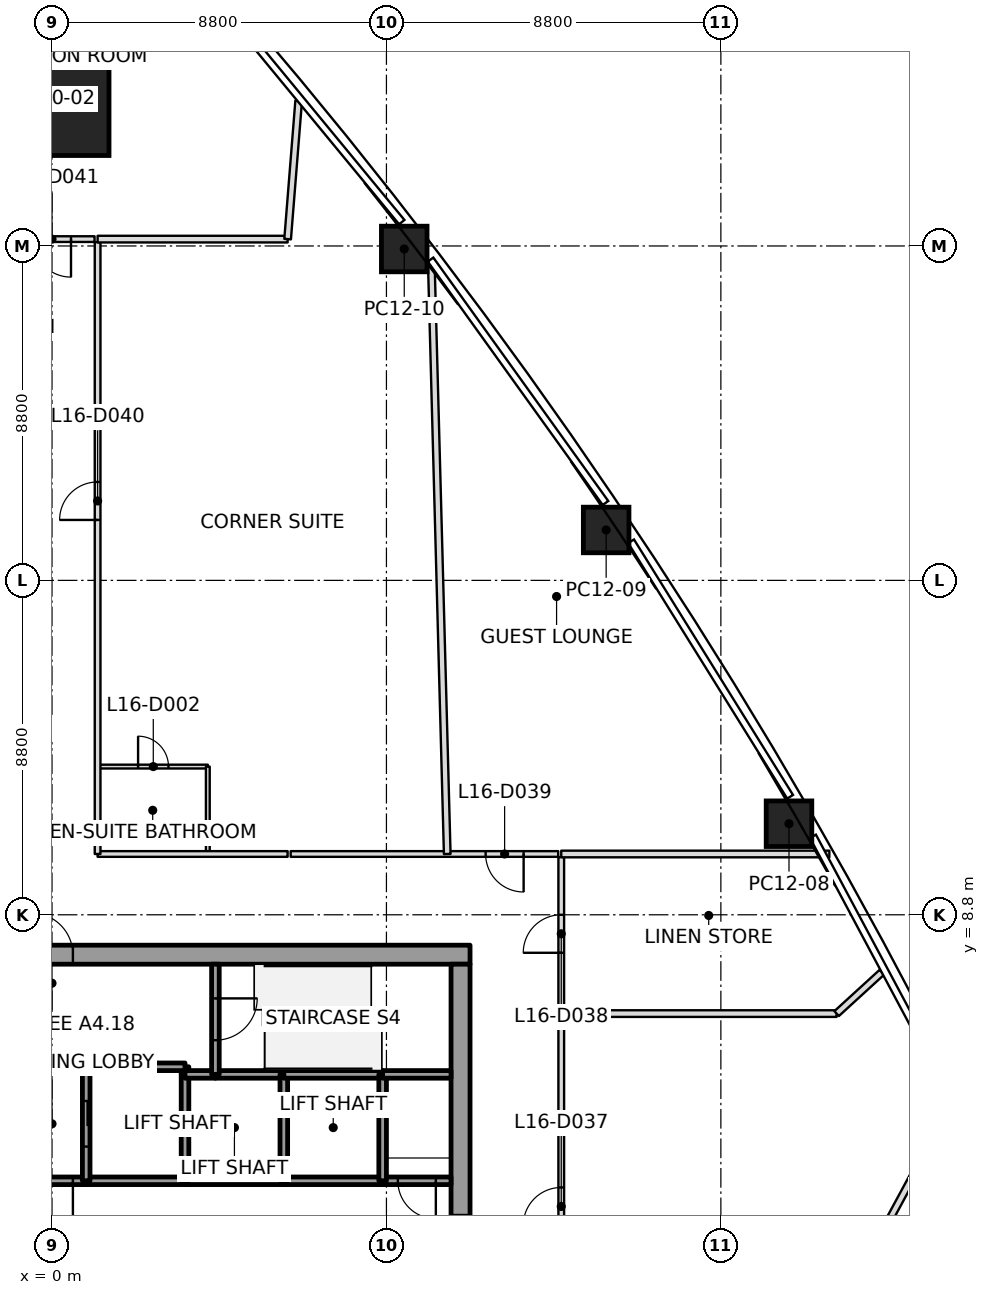
"""IFC4 building model, lengths in metres.
Left out: names, types, materials, properties, quantities, classifications, styles, units other than length and angle.
Written with IfcOpenShell. Run it as: python <this file> out.ifc"""

import sys

from ifc_helpers import new_model, si_unit, direction, frame, frame_2d, origin, origin_2d, place, context, subcontext, project, spatial, rectangle, extrude, element, fill, save


model = new_model("IFC4")
c1 = context("Model", 3, precision=1e-05, world=origin(), true_north=direction((0.0, 1.0)))
c2 = subcontext(c1, "Body", "Model", "MODEL_VIEW")
j1 = project(units=[si_unit("LENGTHUNIT", "METRE"), si_unit("PLANEANGLEUNIT", "RADIAN")], contexts=[c1])
p1 = place(None, origin())
s1 = spatial("IfcSite", under=j1, at=p1, CompositionType="ELEMENT")
p2 = place(p1, origin())
s2 = spatial("IfcBuilding", under=s1, at=p2, CompositionType="ELEMENT")
p3 = place(p2, frame((0.0, 0.0, 81.3)))
s3 = spatial("IfcBuildingStorey", under=s2, at=p3, CompositionType="ELEMENT", Elevation=81.3)
p4 = place(p3, frame((0.0, 30.281, 0.0), z_axis=(0.0, -0.035214042205, 0.999379793288), x_axis=(1.0, 0.0, 0.0)))
e1 = element("IfcColumn", 1, at=p4, inside=s3, PredefinedType="COLUMN", context=c2, shape_type="SweptSolid", body=[
    extrude(rectangle(XDim=3.0, YDim=3.0, at=origin_2d()), origin(), (0.0, 0.0, 1.0), 3.702),
])
p5 = place(p3, frame((19.393, 11.196, 0.0), z_axis=(-0.010688729499, -0.00613612249, 0.999924046647), x_axis=(-0.49997143695, 0.866041893524, -2.9922579e-05)))
e2 = element("IfcColumn", 2, at=p5, inside=s3, PredefinedType="COLUMN", context=c2, shape_type="SweptSolid", body=[
    extrude(rectangle(XDim=1.2, YDim=1.2, at=origin_2d()), origin(), (0.0, 0.0, 1.0), 3.7),
])
p6 = place(p3, frame((14.582, 18.926, 0.0), z_axis=(-0.005674016471, -0.014382971985, 0.999880460682), x_axis=(-0.556275058009, 0.830951674334, 0.008796292314)))
e3 = element("IfcColumn", 3, at=p6, inside=s3, PredefinedType="COLUMN", context=c2, shape_type="SweptSolid", body=[
    extrude(rectangle(XDim=1.2, YDim=1.2, at=origin_2d()), origin(), (0.0, 0.0, 1.0), 3.7),
])
p7 = place(p3, frame((9.269, 26.32, 0.0), z_axis=(-0.00019790496, -0.022363260521, 0.999749891429), x_axis=(-0.610123026815, 0.792111234616, 0.0175978449)))
e4 = element("IfcColumn", 4, at=p7, inside=s3, PredefinedType="COLUMN", context=c2, shape_type="SweptSolid", body=[
    extrude(rectangle(XDim=1.2, YDim=1.2, at=origin_2d()), origin(), (0.0, 0.0, 1.0), 3.701),
])
p8 = place(p3, frame((-11.0, 7.75, 0.0), z_axis=(0.0, 0.0, 1.0), x_axis=(1.0, 0.0, 0.0)))
e5 = element("IfcWall", 5, at=p8, inside=s3, PredefinedType="SHEAR", context=c2, shape_type="SweptSolid", body=[
    extrude(rectangle(XDim=22.0, YDim=0.5, at=frame_2d((11.0, 0.0))), origin(), (0.0, 0.0, 1.0), 3.7),
])
p9 = place(p8, frame((10.45, 0.0, 0.0)))
e6 = element("IfcOpeningElement", 6, at=p9, cuts=e5, PredefinedType="OPENING", context=c2, shape_type="SweptSolid", body=[
    extrude(rectangle(XDim=1.1, YDim=2.1, at=frame_2d((0.55, 1.05))), frame((0.0, 0.25, 0.0), z_axis=(0.0, -1.0, 0.0), x_axis=(1.0, 0.0, 0.0)), (0.0, 0.0, 1.0), 0.5),
])
p10 = place(p3, frame((10.75, -7.5, 0.0), z_axis=(0.0, 0.0, 1.0), x_axis=(0.0, 1.0, 0.0)))
e7 = element("IfcWall", 7, at=p10, inside=s3, PredefinedType="SHEAR", context=c2, shape_type="SweptSolid", body=[
    extrude(rectangle(XDim=15.0, YDim=0.5, at=frame_2d((7.5, 0.0))), origin(), (0.0, 0.0, 1.0), 3.7),
])
p11 = place(p10, frame((6.6, 0.0, 0.0)))
e8 = element("IfcOpeningElement", 8, at=p11, cuts=e7, PredefinedType="OPENING", context=c2, shape_type="SweptSolid", body=[
    extrude(rectangle(XDim=1.8, YDim=2.1, at=frame_2d((0.9, 1.05))), frame((0.0, 0.25, 0.0), z_axis=(0.0, -1.0, 0.0), x_axis=(1.0, 0.0, 0.0)), (0.0, 0.0, 1.0), 0.5),
])
p12 = place(p3, frame((0.9, 1.8, 0.0), z_axis=(0.0, 0.0, 1.0), x_axis=(-1.0, 0.0, 0.0)))
e9 = element("IfcWall", 9, at=p12, inside=s3, PredefinedType="SOLIDWALL", context=c2, shape_type="SweptSolid", body=[
    extrude(rectangle(XDim=1.8, YDim=0.2, at=frame_2d((0.9, 0.0))), origin(), (0.0, 0.0, 1.0), 3.55),
])
p13 = place(p12, frame((0.35, 0.0, 0.0)))
e10 = element("IfcOpeningElement", 10, at=p13, cuts=e9, PredefinedType="OPENING", context=c2, shape_type="SweptSolid", body=[
    extrude(rectangle(XDim=1.1, YDim=2.1, at=frame_2d((0.55, 1.05))), frame((0.0, 0.1, 0.0), z_axis=(0.0, -1.0, 0.0), x_axis=(1.0, 0.0, 0.0)), (0.0, 0.0, 1.0), 0.2),
])
p14 = place(p3, frame((3.5, 1.8, 0.0), z_axis=(0.0, 0.0, 1.0), x_axis=(-1.0, 0.0, 0.0)))
e11 = element("IfcWall", 11, at=p14, inside=s3, PredefinedType="SOLIDWALL", context=c2, shape_type="SweptSolid", body=[
    extrude(rectangle(XDim=2.6, YDim=0.2, at=frame_2d((1.3, 0.0))), origin(), (0.0, 0.0, 1.0), 3.55),
])
p15 = place(p3, frame((3.5, 4.6, 0.0), z_axis=(0.0, 0.0, 1.0), x_axis=(0.0, 1.0, 0.0)))
e12 = element("IfcWall", 12, at=p15, inside=s3, PredefinedType="SOLIDWALL", context=c2, shape_type="SweptSolid", body=[
    extrude(rectangle(XDim=0.2, YDim=0.2, at=frame_2d((0.1, 0.0))), origin(), (0.0, 0.0, 1.0), 3.55),
])
p16 = place(p3, frame((3.5, 4.8, 0.0), z_axis=(0.0, 0.0, 1.0), x_axis=(-1.0, 0.0, 0.0)))
e13 = element("IfcWall", 13, at=p16, inside=s3, PredefinedType="SOLIDWALL", context=c2, shape_type="SweptSolid", body=[
    extrude(rectangle(XDim=2.6, YDim=0.2, at=frame_2d((1.3, 0.0))), origin(), (0.0, 0.0, 1.0), 3.55),
])
p17 = place(p3, frame((0.9, 4.8, 0.0), z_axis=(0.0, 0.0, 1.0), x_axis=(0.0, -1.0, 0.0)))
e14 = element("IfcWall", 14, at=p17, inside=s3, PredefinedType="SOLIDWALL", context=c2, shape_type="SweptSolid", body=[
    extrude(rectangle(XDim=3.0, YDim=0.2, at=frame_2d((1.5, 0.0))), origin(), (0.0, 0.0, 1.0), 3.55),
])
p18 = place(p17, frame((0.9, 0.0, 0.0)))
e15 = element("IfcOpeningElement", 15, at=p18, cuts=e14, PredefinedType="OPENING", context=c2, shape_type="SweptSolid", body=[
    extrude(rectangle(XDim=1.2, YDim=2.1, at=frame_2d((0.6, 1.05))), frame((0.0, 0.1, 0.0), z_axis=(0.0, -1.0, 0.0), x_axis=(1.0, 0.0, 0.0)), (0.0, 0.0, 1.0), 0.2),
])
p19 = place(p3, frame((6.1, 1.8, 0.0), z_axis=(0.0, 0.0, 1.0), x_axis=(-1.0, 0.0, 0.0)))
e16 = element("IfcWall", 16, at=p19, inside=s3, PredefinedType="SOLIDWALL", context=c2, shape_type="SweptSolid", body=[
    extrude(rectangle(XDim=2.6, YDim=0.2, at=frame_2d((1.3, 0.0))), origin(), (0.0, 0.0, 1.0), 3.55),
])
p20 = place(p3, frame((3.5, 1.8, 0.0), z_axis=(0.0, 0.0, 1.0), x_axis=(0.0, 1.0, 0.0)))
e17 = element("IfcWall", 17, at=p20, inside=s3, PredefinedType="SOLIDWALL", context=c2, shape_type="SweptSolid", body=[
    extrude(rectangle(XDim=2.8, YDim=0.2, at=frame_2d((1.4, 0.0))), origin(), (0.0, 0.0, 1.0), 3.55),
])
p21 = place(p3, frame((4.3, 4.6, 0.0), z_axis=(0.0, 0.0, 1.0), x_axis=(-1.0, 0.0, 0.0)))
e18 = element("IfcWall", 18, at=p21, inside=s3, PredefinedType="SOLIDWALL", context=c2, shape_type="SweptSolid", body=[
    extrude(rectangle(XDim=0.8, YDim=0.2, at=frame_2d((0.4, 0.0))), origin(), (0.0, 0.0, 1.0), 3.55),
])
p22 = place(p3, frame((6.1, 4.6, 0.0), z_axis=(0.0, 0.0, 1.0), x_axis=(-1.0, 0.0, 0.0)))
e19 = element("IfcWall", 19, at=p22, inside=s3, PredefinedType="SOLIDWALL", context=c2, shape_type="SweptSolid", body=[
    extrude(rectangle(XDim=1.8, YDim=0.2, at=frame_2d((0.9, 0.0))), origin(), (0.0, 0.0, 1.0), 3.55),
])
p23 = place(p3, frame((4.3, 7.5, 0.0), z_axis=(0.0, 0.0, 1.0), x_axis=(0.0, -1.0, 0.0)))
e20 = element("IfcWall", 20, at=p23, inside=s3, PredefinedType="SOLIDWALL", context=c2, shape_type="SweptSolid", body=[
    extrude(rectangle(XDim=2.9, YDim=0.2, at=frame_2d((1.45, 0.0))), origin(), (0.0, 0.0, 1.0), 3.55),
])
p24 = place(p23, frame((0.9, 0.0, 0.0)))
e21 = element("IfcOpeningElement", 21, at=p24, cuts=e20, PredefinedType="OPENING", context=c2, shape_type="SweptSolid", body=[
    extrude(rectangle(XDim=1.1, YDim=2.1, at=frame_2d((0.55, 1.05))), frame((0.0, 0.1, 0.0), z_axis=(0.0, -1.0, 0.0), x_axis=(1.0, 0.0, 0.0)), (0.0, 0.0, 1.0), 0.2),
])
p25 = place(p3, frame((8.7, 1.8, 0.0), z_axis=(0.0, 0.0, 1.0), x_axis=(-1.0, 0.0, 0.0)))
e22 = element("IfcWall", 22, at=p25, inside=s3, PredefinedType="SOLIDWALL", context=c2, shape_type="SweptSolid", body=[
    extrude(rectangle(XDim=2.6, YDim=0.2, at=frame_2d((1.3, 0.0))), origin(), (0.0, 0.0, 1.0), 3.55),
])
p26 = place(p3, frame((6.1, 1.8, 0.0), z_axis=(0.0, 0.0, 1.0), x_axis=(0.0, 1.0, 0.0)))
e23 = element("IfcWall", 23, at=p26, inside=s3, PredefinedType="SOLIDWALL", context=c2, shape_type="SweptSolid", body=[
    extrude(rectangle(XDim=2.8, YDim=0.2, at=frame_2d((1.4, 0.0))), origin(), (0.0, 0.0, 1.0), 3.55),
])
p27 = place(p3, frame((8.7, 4.6, 0.0), z_axis=(0.0, 0.0, 1.0), x_axis=(-1.0, 0.0, 0.0)))
e24 = element("IfcWall", 24, at=p27, inside=s3, PredefinedType="SOLIDWALL", context=c2, shape_type="SweptSolid", body=[
    extrude(rectangle(XDim=2.6, YDim=0.2, at=frame_2d((1.3, 0.0))), origin(), (0.0, 0.0, 1.0), 3.55),
])
p28 = place(p3, frame((10.5, 1.8, 0.0), z_axis=(0.0, 0.0, 1.0), x_axis=(-1.0, 0.0, 0.0)))
e25 = element("IfcWall", 25, at=p28, inside=s3, PredefinedType="SOLIDWALL", context=c2, shape_type="SweptSolid", body=[
    extrude(rectangle(XDim=1.8, YDim=0.2, at=frame_2d((0.9, 0.0))), origin(), (0.0, 0.0, 1.0), 3.55),
])
p29 = place(p28, frame((0.4, 0.0, 0.0)))
e26 = element("IfcOpeningElement", 26, at=p29, cuts=e25, PredefinedType="OPENING", context=c2, shape_type="SweptSolid", body=[
    extrude(rectangle(XDim=1.0, YDim=2.1, at=frame_2d((0.5, 1.05))), frame((0.0, 0.1, 0.0), z_axis=(0.0, -1.0, 0.0), x_axis=(1.0, 0.0, 0.0)), (0.0, 0.0, 1.0), 0.2),
])
p30 = place(p3, frame((8.7, 4.6, 0.0), z_axis=(0.0, 0.0, 1.0), x_axis=(0.0, -1.0, 0.0)))
e27 = element("IfcWall", 27, at=p30, inside=s3, PredefinedType="SOLIDWALL", context=c2, shape_type="SweptSolid", body=[
    extrude(rectangle(XDim=2.8, YDim=0.2, at=frame_2d((1.4, 0.0))), origin(), (0.0, 0.0, 1.0), 3.55),
])
p31 = place(p3, frame((10.5, 4.6, 0.0), z_axis=(0.0, 0.0, 1.0), x_axis=(-1.0, 0.0, 0.0)))
e28 = element("IfcWall", 28, at=p31, inside=s3, PredefinedType="SOLIDWALL", context=c2, shape_type="SweptSolid", body=[
    extrude(rectangle(XDim=1.8, YDim=0.2, at=frame_2d((0.9, 0.0))), origin(), (0.0, 0.0, 1.0), 3.55),
])
p32 = place(p3, frame((1.2, 26.581, 0.0), z_axis=(0.0, 0.0, 1.0), x_axis=(1.0, 0.0, 0.0)))
e29 = element("IfcWall", 29, at=p32, inside=s3, PredefinedType="PARTITIONING", context=c2, shape_type="SweptSolid", body=[
    extrude(rectangle(XDim=5.0, YDim=0.175, at=frame_2d((2.5, 0.0))), origin(), (0.0, 0.0, 1.0), 3.15),
])
p33 = place(p3, frame((6.2, 26.581, 0.0), z_axis=(0.0, 0.0, 1.0), x_axis=(0.079662809164, 0.996821868157, 0.0)))
e30 = element("IfcWall", 30, at=p33, inside=s3, PredefinedType="PARTITIONING", context=c2, shape_type="SweptSolid", body=[
    extrude(rectangle(XDim=3.65, YDim=0.175, at=frame_2d((1.825, 0.0))), origin(), (0.0, 0.0, 1.0), 2.934),
])
p34 = place(p3, frame((9.981, 25.913, 0.0), z_axis=(0.0, 0.0, 1.0), x_axis=(0.02696447667, -0.999636392394, 0.0)))
e31 = element("IfcWall", 31, at=p34, inside=s3, PredefinedType="PARTITIONING", context=c2, shape_type="SweptSolid", body=[
    extrude(rectangle(XDim=15.519, YDim=0.175, at=frame_2d((7.759, 0.0))), origin(), (0.0, 0.0, 1.0), 2.934),
])
p35 = place(p3, frame((13.4, 6.2, 0.0), z_axis=(0.0, 0.0, 1.0), x_axis=(1.0, 0.0, 0.0)))
e32 = element("IfcWall", 32, at=p35, inside=s3, PredefinedType="PARTITIONING", context=c2, shape_type="SweptSolid", body=[
    extrude(rectangle(XDim=7.246, YDim=0.175, at=frame_2d((3.623, 0.0))), origin(), (0.0, 0.0, 1.0), 3.017),
])
p36 = place(p3, frame((20.646, 6.2, 0.0), z_axis=(0.0, 0.0, 1.0), x_axis=(0.738108499595, 0.674682030905, 0.0)))
e33 = element("IfcWall", 33, at=p36, inside=s3, PredefinedType="PARTITIONING", context=c2, shape_type="SweptSolid", body=[
    extrude(rectangle(XDim=1.613, YDim=0.175, at=frame_2d((0.806, 0.0))), origin(), (0.0, 0.0, 1.0), 2.934),
])
p37 = place(p3, frame((13.4, 10.4, 0.0), z_axis=(0.0, 0.0, 1.0), x_axis=(1.0, 0.0, 0.0)))
e34 = element("IfcWall", 34, at=p37, inside=s3, PredefinedType="PARTITIONING", context=c2, shape_type="SweptSolid", body=[
    extrude(rectangle(XDim=7.055, YDim=0.175, at=frame_2d((3.527, 0.0))), origin(), (0.0, 0.0, 1.0), 2.934),
])
p38 = place(p3, frame((23.685, 3.826, 0.0), z_axis=(0.0, 0.0, 1.0), x_axis=(-0.476143437268, -0.879367629121, 0.0)))
e35 = element("IfcWall", 35, at=p38, inside=s3, PredefinedType="PARTITIONING", context=c2, shape_type="SweptSolid", body=[
    extrude(rectangle(XDim=13.962, YDim=0.175, at=frame_2d((6.981, 0.0))), origin(), (0.0, 0.0, 1.0), 2.947),
])
p39 = place(p3, frame((1.12, 26.581, 0.0), z_axis=(0.0, 0.0, 1.0), x_axis=(-1.0, 0.0, 0.0)))
e36 = element("IfcWall", 36, at=p39, inside=s3, PredefinedType="PARTITIONING", context=c2, shape_type="SweptSolid", body=[
    extrude(rectangle(XDim=2.24, YDim=0.15, at=frame_2d((1.12, 0.0))), origin(), (0.0, 0.0, 1.0), 2.797),
])
p40 = place(p39, frame((0.62, 0.0, 0.0)))
e37 = element("IfcOpeningElement", 37, at=p40, cuts=e36, PredefinedType="OPENING", context=c2, shape_type="SweptSolid", body=[
    extrude(rectangle(XDim=1.0, YDim=2.1, at=frame_2d((0.5, 1.05))), frame((0.0, 0.075, 0.0), z_axis=(0.0, -1.0, 0.0), x_axis=(1.0, 0.0, 0.0)), (0.0, 0.0, 1.0), 0.15),
])
p41 = place(p3, frame((6.2, 10.4, 0.0), z_axis=(0.0, 0.0, 1.0), x_axis=(-1.0, 0.0, 0.0)))
e38 = element("IfcWall", 38, at=p41, inside=s3, PredefinedType="PARTITIONING", context=c2, shape_type="SweptSolid", body=[
    extrude(rectangle(XDim=5.0, YDim=0.15, at=frame_2d((2.5, 0.0))), origin(), (0.0, 0.0, 1.0), 3.15),
])
p42 = place(p3, frame((1.2, 10.4, 0.0), z_axis=(0.0, 0.0, 1.0), x_axis=(0.0, 1.0, 0.0)))
e39 = element("IfcWall", 39, at=p42, inside=s3, PredefinedType="PARTITIONING", context=c2, shape_type="SweptSolid", body=[
    extrude(rectangle(XDim=16.101, YDim=0.15, at=frame_2d((8.05, 0.0))), origin(), (0.0, 0.0, 1.0), 2.947),
])
p43 = place(p42, frame((8.79, 0.0, 0.0)))
e40 = element("IfcOpeningElement", 40, at=p43, cuts=e39, PredefinedType="OPENING", context=c2, shape_type="SweptSolid", body=[
    extrude(rectangle(XDim=1.0, YDim=2.1, at=frame_2d((0.5, 1.05))), frame((0.0, 0.075, 0.0), z_axis=(0.0, -1.0, 0.0), x_axis=(1.0, 0.0, 0.0)), (0.0, 0.0, 1.0), 0.15),
])
p44 = place(p3, frame((13.32, 10.4, 0.0), z_axis=(0.0, 0.0, 1.0), x_axis=(-1.0, 0.0, 0.0)))
e41 = element("IfcWall", 41, at=p44, inside=s3, PredefinedType="PARTITIONING", context=c2, shape_type="SweptSolid", body=[
    extrude(rectangle(XDim=7.04, YDim=0.15, at=frame_2d((3.52, 0.0))), origin(), (0.0, 0.0, 1.0), 2.947),
])
p45 = place(p44, frame((0.91, 0.0, 0.0)))
e42 = element("IfcOpeningElement", 42, at=p45, cuts=e41, PredefinedType="OPENING", context=c2, shape_type="SweptSolid", body=[
    extrude(rectangle(XDim=1.0, YDim=2.1, at=frame_2d((0.5, 1.05))), frame((0.0, 0.075, 0.0), z_axis=(0.0, -1.0, 0.0), x_axis=(1.0, 0.0, 0.0)), (0.0, 0.0, 1.0), 0.15),
])
p46 = place(p3, frame((13.4, -6.351, 0.0), z_axis=(0.0, 0.0, 1.0), x_axis=(0.0, 1.0, 0.0)))
e43 = element("IfcWall", 43, at=p46, inside=s3, PredefinedType="PARTITIONING", context=c2, shape_type="SweptSolid", body=[
    extrude(rectangle(XDim=16.671, YDim=0.15, at=frame_2d((8.335, 0.0))), origin(), (0.0, 0.0, 1.0), 2.947),
])
p47 = place(p46, frame((6.976, 0.0, 0.0)))
e44 = element("IfcOpeningElement", 44, at=p47, cuts=e43, PredefinedType="OPENING", context=c2, shape_type="SweptSolid", body=[
    extrude(rectangle(XDim=1.0, YDim=2.1, at=frame_2d((0.5, 1.05))), frame((0.0, 0.075, 0.0), z_axis=(0.0, -1.0, 0.0), x_axis=(1.0, 0.0, 0.0)), (0.0, 0.0, 1.0), 0.15),
])
p48 = place(p46, frame((14.151, 0.0, 0.0)))
e45 = element("IfcOpeningElement", 45, at=p48, cuts=e43, PredefinedType="OPENING", context=c2, shape_type="SweptSolid", body=[
    extrude(rectangle(XDim=1.0, YDim=2.1, at=frame_2d((0.5, 1.05))), frame((0.0, 0.075, 0.0), z_axis=(0.0, -1.0, 0.0), x_axis=(1.0, 0.0, 0.0)), (0.0, 0.0, 1.0), 0.15),
])
p49 = place(p3, frame((1.23, 12.7, 0.0), z_axis=(0.0, 0.0, 1.0), x_axis=(1.0, 0.0, 0.0)))
e46 = element("IfcWall", 46, at=p49, inside=s3, PredefinedType="PARTITIONING", context=c2, shape_type="SweptSolid", body=[
    extrude(rectangle(XDim=2.87, YDim=0.1, at=frame_2d((1.435, 0.0))), origin(), (0.0, 0.0, 1.0), 3.15),
])
p50 = place(p49, frame((1.035, 0.0, 0.0)))
e47 = element("IfcOpeningElement", 47, at=p50, cuts=e46, PredefinedType="OPENING", context=c2, shape_type="SweptSolid", body=[
    extrude(rectangle(XDim=0.8, YDim=2.1, at=frame_2d((0.4, 1.05))), frame((0.0, 0.05, 0.0), z_axis=(0.0, -1.0, 0.0), x_axis=(1.0, 0.0, 0.0)), (0.0, 0.0, 1.0), 0.1),
])
p51 = place(p3, frame((4.1, 12.7, 0.0), z_axis=(0.0, 0.0, 1.0), x_axis=(0.0, -1.0, 0.0)))
e48 = element("IfcWall", 48, at=p51, inside=s3, PredefinedType="PARTITIONING", context=c2, shape_type="SweptSolid", body=[
    extrude(rectangle(XDim=2.27, YDim=0.1, at=frame_2d((1.135, 0.0))), origin(), (0.0, 0.0, 1.0), 3.15),
])
p52 = place(p47, origin())
e49 = element("IfcDoor", 49, at=p52, inside=s3, OperationType="SINGLE_SWING_LEFT", PredefinedType="DOOR", context=c2, shape_type="SweptSolid", body=[
    extrude(rectangle(XDim=1.0, YDim=2.1, at=frame_2d((0.5, 1.05))), frame((0.0, 0.025, 0.0), z_axis=(0.0, -1.0, 0.0), x_axis=(1.0, 0.0, 0.0)), (0.0, 0.0, 1.0), 0.05),
])
fill(e44, e49)
p53 = place(p48, origin())
e50 = element("IfcDoor", 50, at=p53, inside=s3, OperationType="SINGLE_SWING_LEFT", PredefinedType="DOOR", context=c2, shape_type="SweptSolid", body=[
    extrude(rectangle(XDim=1.0, YDim=2.1, at=frame_2d((0.5, 1.05))), frame((0.0, 0.025, 0.0), z_axis=(0.0, -1.0, 0.0), x_axis=(1.0, 0.0, 0.0)), (0.0, 0.0, 1.0), 0.05),
])
fill(e45, e50)
p54 = place(p45, origin())
e51 = element("IfcDoor", 51, at=p54, inside=s3, OperationType="SINGLE_SWING_LEFT", PredefinedType="DOOR", context=c2, shape_type="SweptSolid", body=[
    extrude(rectangle(XDim=1.0, YDim=2.1, at=frame_2d((0.5, 1.05))), frame((0.0, 0.025, 0.0), z_axis=(0.0, -1.0, 0.0), x_axis=(1.0, 0.0, 0.0)), (0.0, 0.0, 1.0), 0.05),
])
fill(e42, e51)
p55 = place(p43, origin())
e52 = element("IfcDoor", 52, at=p55, inside=s3, OperationType="SINGLE_SWING_RIGHT", PredefinedType="DOOR", context=c2, shape_type="SweptSolid", body=[
    extrude(rectangle(XDim=1.0, YDim=2.1, at=frame_2d((0.5, 1.05))), frame((0.0, 0.025, 0.0), z_axis=(0.0, -1.0, 0.0), x_axis=(1.0, 0.0, 0.0)), (0.0, 0.0, 1.0), 0.05),
])
fill(e40, e52)
p56 = place(p50, origin())
e53 = element("IfcDoor", 53, at=p56, inside=s3, OperationType="SINGLE_SWING_LEFT", PredefinedType="DOOR", context=c2, shape_type="SweptSolid", body=[
    extrude(rectangle(XDim=0.8, YDim=2.1, at=frame_2d((0.4, 1.05))), frame((0.0, 0.025, 0.0), z_axis=(0.0, -1.0, 0.0), x_axis=(1.0, 0.0, 0.0)), (0.0, 0.0, 1.0), 0.05),
])
fill(e47, e53)
p57 = place(p40, origin())
e54 = element("IfcDoor", 54, at=p57, inside=s3, OperationType="SINGLE_SWING_LEFT", PredefinedType="DOOR", context=c2, shape_type="SweptSolid", body=[
    extrude(rectangle(XDim=1.0, YDim=2.1, at=frame_2d((0.5, 1.05))), frame((0.0, 0.025, 0.0), z_axis=(0.0, -1.0, 0.0), x_axis=(1.0, 0.0, 0.0)), (0.0, 0.0, 1.0), 0.05),
])
fill(e37, e54)
p58 = place(p18, origin())
e55 = element("IfcDoor", 55, at=p58, inside=s3, OperationType="SLIDING_TO_RIGHT", PredefinedType="DOOR", context=c2, shape_type="SweptSolid", body=[
    extrude(rectangle(XDim=1.2, YDim=2.1, at=frame_2d((0.6, 1.05))), frame((0.0, 0.025, 0.0), z_axis=(0.0, -1.0, 0.0), x_axis=(1.0, 0.0, 0.0)), (0.0, 0.0, 1.0), 0.05),
])
fill(e15, e55)
p59 = place(p13, origin())
e56 = element("IfcDoor", 56, at=p59, inside=s3, OperationType="SINGLE_SWING_RIGHT", PredefinedType="DOOR", context=c2, shape_type="SweptSolid", body=[
    extrude(rectangle(XDim=1.1, YDim=2.1, at=frame_2d((0.55, 1.05))), frame((0.0, 0.025, 0.0), z_axis=(0.0, -1.0, 0.0), x_axis=(1.0, 0.0, 0.0)), (0.0, 0.0, 1.0), 0.05),
])
fill(e10, e56)
p60 = place(p29, origin())
e57 = element("IfcDoor", 57, at=p60, inside=s3, OperationType="SINGLE_SWING_RIGHT", PredefinedType="DOOR", context=c2, shape_type="SweptSolid", body=[
    extrude(rectangle(XDim=1.0, YDim=2.1, at=frame_2d((0.5, 1.05))), frame((0.0, 0.025, 0.0), z_axis=(0.0, -1.0, 0.0), x_axis=(1.0, 0.0, 0.0)), (0.0, 0.0, 1.0), 0.05),
])
fill(e26, e57)
p61 = place(p24, origin())
e58 = element("IfcDoor", 58, at=p61, inside=s3, OperationType="SINGLE_SWING_LEFT", PredefinedType="DOOR", context=c2, shape_type="SweptSolid", body=[
    extrude(rectangle(XDim=1.1, YDim=2.1, at=frame_2d((0.55, 1.05))), frame((0.0, 0.025, 0.0), z_axis=(0.0, -1.0, 0.0), x_axis=(1.0, 0.0, 0.0)), (0.0, 0.0, 1.0), 0.05),
])
fill(e21, e58)
p62 = place(p11, origin())
e59 = element("IfcDoor", 59, at=p62, inside=s3, OperationType="DOUBLE_DOOR_SINGLE_SWING", PredefinedType="DOOR", context=c2, shape_type="SweptSolid", body=[
    extrude(rectangle(XDim=1.8, YDim=2.1, at=frame_2d((0.9, 1.05))), frame((0.0, 0.025, 0.0), z_axis=(0.0, -1.0, 0.0), x_axis=(1.0, 0.0, 0.0)), (0.0, 0.0, 1.0), 0.05),
])
fill(e8, e59)
p63 = place(p9, origin())
e60 = element("IfcDoor", 60, at=p63, inside=s3, OperationType="SINGLE_SWING_LEFT", PredefinedType="DOOR", context=c2, shape_type="SweptSolid", body=[
    extrude(rectangle(XDim=1.1, YDim=2.1, at=frame_2d((0.55, 1.05))), frame((0.0, 0.025, 0.0), z_axis=(0.0, -1.0, 0.0), x_axis=(1.0, 0.0, 0.0)), (0.0, 0.0, 1.0), 0.05),
])
fill(e6, e60)
save(model, sys.argv[1])
